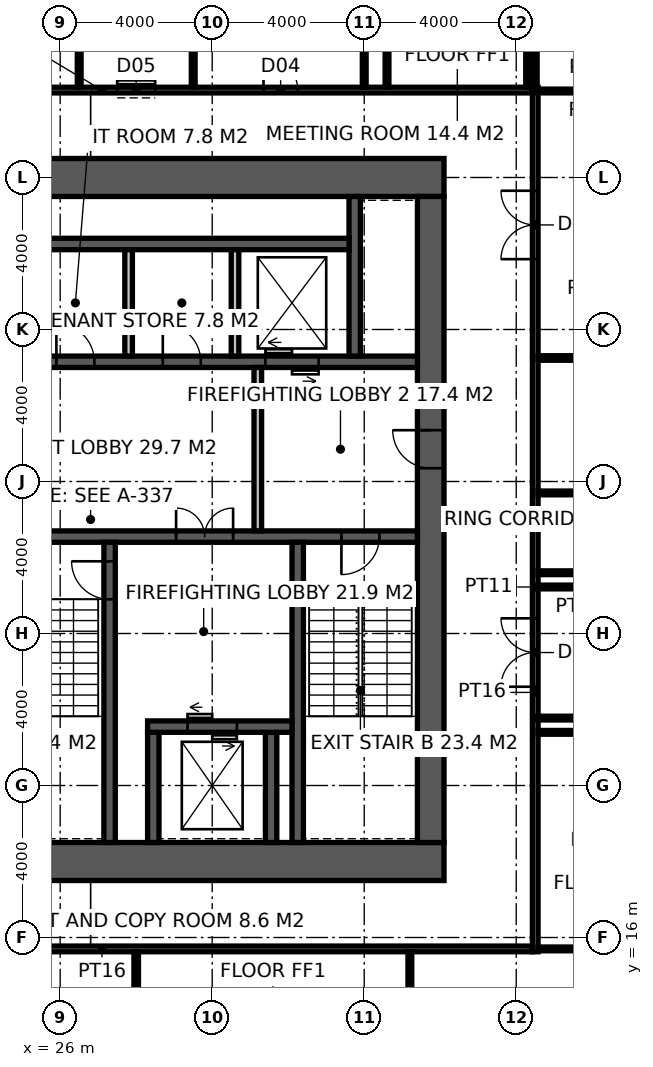
"""IFC4 building model, lengths in metres.
Left out: names, types, materials, properties, quantities, classifications, styles, units other than length and angle.
Written with IfcOpenShell. Run it as: python <this file> out.ifc"""

import sys

from ifc_helpers import new_model, si_unit, direction, frame, frame_2d, origin, place, context, subcontext, project, spatial, rectangle, extrude, element, fill, save


model = new_model("IFC4")
c1 = context("Model", 3, precision=1e-05, world=origin(), true_north=direction((0.0, 1.0)))
c2 = subcontext(c1, "Body", "Model", "MODEL_VIEW")
j1 = project(units=[si_unit("LENGTHUNIT", "METRE"), si_unit("PLANEANGLEUNIT", "RADIAN")], contexts=[c1])
p1 = place(None, origin())
s1 = spatial("IfcSite", under=j1, at=p1, CompositionType="ELEMENT")
p2 = place(p1, origin())
s2 = spatial("IfcBuilding", under=s1, at=p2, CompositionType="ELEMENT")
p3 = place(p2, frame((0.0, 0.0, 230.2)))
s3 = spatial("IfcBuildingStorey", under=s2, at=p3, CompositionType="ELEMENT", Elevation=230.2)
p4 = place(p3, frame((18.5, 18.0, -0.15), z_axis=(0.0, 0.0, 1.0), x_axis=(1.0, 0.0, 0.0)))
e1 = element("IfcWall", 1, at=p4, inside=s3, PredefinedType="SHEAR", context=c2, shape_type="SweptSolid", body=[
    extrude(rectangle(XDim=17.6, YDim=1.0, at=frame_2d((8.8, 0.0))), origin(), (0.0, 0.0, 1.0), 4.0),
])
p5 = place(p4, frame((3.45, 0.0, 0.15)))
e2 = element("IfcOpeningElement", 2, at=p5, cuts=e1, PredefinedType="OPENING", context=c2, shape_type="SweptSolid", body=[
    extrude(rectangle(XDim=1.5, YDim=2.4, at=frame_2d((0.75, 1.2))), frame((0.0, 0.51, 0.0), z_axis=(0.0, -1.0, 0.0), x_axis=(1.0, 0.0, 0.0)), (0.0, 0.0, 1.0), 1.02),
])
p6 = place(p3, frame((18.5, 36.0, -0.15), z_axis=(0.0, 0.0, 1.0), x_axis=(1.0, 0.0, 0.0)))
e3 = element("IfcWall", 3, at=p6, inside=s3, PredefinedType="SHEAR", context=c2, shape_type="SweptSolid", body=[
    extrude(rectangle(XDim=17.6, YDim=1.0, at=frame_2d((8.8, 0.0))), origin(), (0.0, 0.0, 1.0), 4.0),
])
p7 = place(p3, frame((35.75, 18.5, -0.15), z_axis=(0.0, 0.0, 1.0), x_axis=(0.0, 1.0, 0.0)))
e4 = element("IfcWall", 4, at=p7, inside=s3, PredefinedType="SHEAR", context=c2, shape_type="SweptSolid", body=[
    extrude(rectangle(XDim=17.0, YDim=0.7, at=frame_2d((8.5, 0.0))), origin(), (0.0, 0.0, 1.0), 4.0),
])
p8 = place(p7, frame((9.85, 0.0, 0.15)))
e5 = element("IfcOpeningElement", 5, at=p8, cuts=e4, PredefinedType="OPENING", context=c2, shape_type="SweptSolid", body=[
    extrude(rectangle(XDim=1.0, YDim=2.2, at=frame_2d((0.5, 1.1))), frame((0.0, 0.36, 0.0), z_axis=(0.0, -1.0, 0.0), x_axis=(1.0, 0.0, 0.0)), (0.0, 0.0, 1.0), 0.72),
])
p9 = place(p3, frame((24.15, 26.55, -0.15), z_axis=(0.0, 0.0, 1.0), x_axis=(1.0, 0.0, 0.0)))
e6 = element("IfcWall", 6, at=p9, inside=s3, PredefinedType="SHEAR", context=c2, shape_type="SweptSolid", body=[
    extrude(rectangle(XDim=11.25, YDim=0.3, at=frame_2d((5.625, 0.0))), origin(), (0.0, 0.0, 1.0), 4.0),
])
p10 = place(p9, frame((9.25, 0.0, 0.15)))
e7 = element("IfcOpeningElement", 7, at=p10, cuts=e6, PredefinedType="OPENING", context=c2, shape_type="SweptSolid", body=[
    extrude(rectangle(XDim=1.0, YDim=2.2, at=frame_2d((0.5, 1.1))), frame((0.0, 0.16, 0.0), z_axis=(0.0, -1.0, 0.0), x_axis=(1.0, 0.0, 0.0)), (0.0, 0.0, 1.0), 0.32),
])
p11 = place(p9, frame((4.9, 0.0, 0.15)))
e8 = element("IfcOpeningElement", 8, at=p11, cuts=e6, PredefinedType="OPENING", context=c2, shape_type="SweptSolid", body=[
    extrude(rectangle(XDim=1.5, YDim=2.4, at=frame_2d((0.75, 1.2))), frame((0.0, 0.16, 0.0), z_axis=(0.0, -1.0, 0.0), x_axis=(1.0, 0.0, 0.0)), (0.0, 0.0, 1.0), 0.32),
])
p12 = place(p3, frame((27.3, 18.5, -0.15), z_axis=(0.0, 0.0, 1.0), x_axis=(0.0, 1.0, 0.0)))
e9 = element("IfcWall", 9, at=p12, inside=s3, PredefinedType="SHEAR", context=c2, shape_type="SweptSolid", body=[
    extrude(rectangle(XDim=7.9, YDim=0.3, at=frame_2d((3.95, 0.0))), origin(), (0.0, 0.0, 1.0), 4.0),
])
p13 = place(p12, frame((6.4, 0.0, 0.15)))
e10 = element("IfcOpeningElement", 10, at=p13, cuts=e9, PredefinedType="OPENING", context=c2, shape_type="SweptSolid", body=[
    extrude(rectangle(XDim=1.0, YDim=2.2, at=frame_2d((0.5, 1.1))), frame((0.0, 0.16, 0.0), z_axis=(0.0, -1.0, 0.0), x_axis=(1.0, 0.0, 0.0)), (0.0, 0.0, 1.0), 0.32),
])
p14 = place(p3, frame((32.25, 18.5, -0.15), z_axis=(0.0, 0.0, 1.0), x_axis=(0.0, 1.0, 0.0)))
e11 = element("IfcWall", 11, at=p14, inside=s3, PredefinedType="SHEAR", context=c2, shape_type="SweptSolid", body=[
    extrude(rectangle(XDim=7.9, YDim=0.3, at=frame_2d((3.95, 0.0))), origin(), (0.0, 0.0, 1.0), 4.0),
])
for number, where, z_axis, x_axis in (
    (12, (28.45, 18.5, -0.15), (0.0, 0.0, 1.0), (0.0, 1.0, 0.0)),
    (13, (31.55, 18.5, -0.15), (0.0, 0.0, 1.0), (0.0, 1.0, 0.0)),
):
    element("IfcWall", number, at=place(p3, frame(where, z_axis=z_axis, x_axis=x_axis)), inside=s3, PredefinedType="SHEAR", context=c2, shape_type="SweptSolid", body=[
        extrude(rectangle(XDim=2.9, YDim=0.3, at=frame_2d((1.45, 0.0))), origin(), (0.0, 0.0, 1.0), 4.0),
    ])
p15 = place(p3, frame((28.3, 21.55, -0.15), z_axis=(0.0, 0.0, 1.0), x_axis=(1.0, 0.0, 0.0)))
e14 = element("IfcWall", 14, at=p15, inside=s3, PredefinedType="SHEAR", context=c2, shape_type="SweptSolid", body=[
    extrude(rectangle(XDim=3.8, YDim=0.3, at=frame_2d((1.9, 0.0))), origin(), (0.0, 0.0, 1.0), 4.0),
])
p16 = place(p15, frame((1.05, 0.0, 0.15)))
e15 = element("IfcOpeningElement", 15, at=p16, cuts=e14, PredefinedType="OPENING", context=c2, shape_type="SweptSolid", body=[
    extrude(rectangle(XDim=1.3, YDim=2.4, at=frame_2d((0.65, 1.2))), frame((0.0, 0.16, 0.0), z_axis=(0.0, -1.0, 0.0), x_axis=(1.0, 0.0, 0.0)), (0.0, 0.0, 1.0), 0.32),
])
p17 = place(p3, frame((24.15, 31.15, -0.15), z_axis=(0.0, 0.0, 1.0), x_axis=(1.0, 0.0, 0.0)))
e16 = element("IfcWall", 16, at=p17, inside=s3, PredefinedType="SHEAR", context=c2, shape_type="SweptSolid", body=[
    extrude(rectangle(XDim=11.25, YDim=0.3, at=frame_2d((5.625, 0.0))), origin(), (0.0, 0.0, 1.0), 4.0),
])
p18 = place(p17, frame((1.75, 0.0, 0.15)))
e17 = element("IfcOpeningElement", 17, at=p18, cuts=e16, PredefinedType="OPENING", context=c2, shape_type="SweptSolid", body=[
    extrude(rectangle(XDim=1.0, YDim=2.2, at=frame_2d((0.5, 1.1))), frame((0.0, 0.16, 0.0), z_axis=(0.0, -1.0, 0.0), x_axis=(1.0, 0.0, 0.0)), (0.0, 0.0, 1.0), 0.32),
])
p19 = place(p17, frame((4.55, 0.0, 0.15)))
e18 = element("IfcOpeningElement", 18, at=p19, cuts=e16, PredefinedType="OPENING", context=c2, shape_type="SweptSolid", body=[
    extrude(rectangle(XDim=1.0, YDim=2.2, at=frame_2d((0.5, 1.1))), frame((0.0, 0.16, 0.0), z_axis=(0.0, -1.0, 0.0), x_axis=(1.0, 0.0, 0.0)), (0.0, 0.0, 1.0), 0.32),
])
p20 = place(p17, frame((7.25, 0.0, 0.15)))
e19 = element("IfcOpeningElement", 19, at=p20, cuts=e16, PredefinedType="OPENING", context=c2, shape_type="SweptSolid", body=[
    extrude(rectangle(XDim=1.4, YDim=2.4, at=frame_2d((0.7, 1.2))), frame((0.0, 0.16, 0.0), z_axis=(0.0, -1.0, 0.0), x_axis=(1.0, 0.0, 0.0)), (0.0, 0.0, 1.0), 0.32),
])
p21 = place(p3, frame((33.75, 31.3, -0.15), z_axis=(0.0, 0.0, 1.0), x_axis=(0.0, 1.0, 0.0)))
e20 = element("IfcWall", 20, at=p21, inside=s3, PredefinedType="SHEAR", context=c2, shape_type="SweptSolid", body=[
    extrude(rectangle(XDim=4.2, YDim=0.3, at=frame_2d((2.1, 0.0))), origin(), (0.0, 0.0, 1.0), 4.0),
])
p22 = place(p3, frame((25.0, 34.25, -0.15), z_axis=(0.0, 0.0, 1.0), x_axis=(1.0, 0.0, 0.0)))
e21 = element("IfcWall", 21, at=p22, inside=s3, PredefinedType="SHEAR", context=c2, shape_type="SweptSolid", body=[
    extrude(rectangle(XDim=8.6, YDim=0.3, at=frame_2d((4.3, 0.0))), origin(), (0.0, 0.0, 1.0), 4.0),
])
for number, where, z_axis, x_axis in (
    (22, (27.8, 31.3, -0.15), (0.0, 0.0, 1.0), (0.0, 1.0, 0.0)),
    (23, (30.6, 31.3, -0.15), (0.0, 0.0, 1.0), (0.0, 1.0, 0.0)),
):
    element("IfcWall", number, at=place(p3, frame(where, z_axis=z_axis, x_axis=x_axis)), inside=s3, PredefinedType="SOLIDWALL", context=c2, shape_type="SweptSolid", body=[
        extrude(rectangle(XDim=2.8, YDim=0.2, at=frame_2d((1.4, 0.0))), origin(), (0.0, 0.0, 1.0), 4.0),
    ])
p23 = place(p3, frame((31.2, 26.7, 0.0), z_axis=(0.0, 0.0, 1.0), x_axis=(0.0, 1.0, 0.0)))
e24 = element("IfcWall", 24, at=p23, inside=s3, PredefinedType="SOLIDWALL", context=c2, shape_type="SweptSolid", body=[
    extrude(rectangle(XDim=4.3, YDim=0.2, at=frame_2d((2.15, 0.0))), origin(), (0.0, 0.0, 1.0), 3.85),
])
p24 = place(p3, frame((38.5, 15.625, 0.0), z_axis=(0.0, 0.0, 1.0), x_axis=(0.0, 1.0, 0.0)))
e25 = element("IfcWall", 25, at=p24, inside=s3, PredefinedType="PARTITIONING", context=c2, shape_type="SweptSolid", body=[
    extrude(rectangle(XDim=22.75, YDim=0.15, at=frame_2d((11.375, 0.0))), origin(), (0.0, 0.0, 1.0), 3.85),
])
p25 = place(p24, frame((6.974, 0.0, 0.0)))
e26 = element("IfcOpeningElement", 26, at=p25, cuts=e25, PredefinedType="OPENING", context=c2, shape_type="SweptSolid", body=[
    extrude(rectangle(XDim=1.8, YDim=2.4, at=frame_2d((0.9, 1.2))), frame((0.0, 0.085, 0.0), z_axis=(0.0, -1.0, 0.0), x_axis=(1.0, 0.0, 0.0)), (0.0, 0.0, 1.0), 0.17),
])
p26 = place(p24, frame((18.226, 0.0, 0.0)))
e27 = element("IfcOpeningElement", 27, at=p26, cuts=e25, PredefinedType="OPENING", context=c2, shape_type="SweptSolid", body=[
    extrude(rectangle(XDim=1.8, YDim=2.4, at=frame_2d((0.9, 1.2))), frame((0.0, 0.085, 0.0), z_axis=(0.0, -1.0, 0.0), x_axis=(1.0, 0.0, 0.0)), (0.0, 0.0, 1.0), 0.17),
])
p27 = place(p3, frame((15.775, 15.7, 0.0), z_axis=(0.0, 0.0, 1.0), x_axis=(1.0, 0.0, 0.0)))
e28 = element("IfcWall", 28, at=p27, inside=s3, PredefinedType="PARTITIONING", context=c2, shape_type="SweptSolid", body=[
    extrude(rectangle(XDim=22.65, YDim=0.15, at=frame_2d((11.325, 0.0))), origin(), (0.0, 0.0, 1.0), 3.85),
])
p28 = place(p3, frame((15.775, 38.3, 0.0), z_axis=(0.0, 0.0, 1.0), x_axis=(1.0, 0.0, 0.0)))
e29 = element("IfcWall", 29, at=p28, inside=s3, PredefinedType="PARTITIONING", context=c2, shape_type="SweptSolid", body=[
    extrude(rectangle(XDim=22.65, YDim=0.15, at=frame_2d((11.325, 0.0))), origin(), (0.0, 0.0, 1.0), 3.85),
])
p29 = place(p28, frame((7.975, 0.0, 0.0)))
e30 = element("IfcOpeningElement", 30, at=p29, cuts=e29, PredefinedType="OPENING", context=c2, shape_type="SweptSolid", body=[
    extrude(rectangle(XDim=0.9, YDim=2.1, at=frame_2d((0.45, 1.05))), frame((0.0, 0.085, 0.0), z_axis=(0.0, -1.0, 0.0), x_axis=(1.0, 0.0, 0.0)), (0.0, 0.0, 1.0), 0.17),
])
p30 = place(p28, frame((11.725, 0.0, 0.0)))
e31 = element("IfcOpeningElement", 31, at=p30, cuts=e29, PredefinedType="OPENING", context=c2, shape_type="SweptSolid", body=[
    extrude(rectangle(XDim=1.0, YDim=2.1, at=frame_2d((0.5, 1.05))), frame((0.0, 0.085, 0.0), z_axis=(0.0, -1.0, 0.0), x_axis=(1.0, 0.0, 0.0)), (0.0, 0.0, 1.0), 0.17),
])
p31 = place(p28, frame((15.575, 0.0, 0.0)))
e32 = element("IfcOpeningElement", 32, at=p31, cuts=e29, PredefinedType="OPENING", context=c2, shape_type="SweptSolid", body=[
    extrude(rectangle(XDim=0.9, YDim=2.1, at=frame_2d((0.45, 1.05))), frame((0.0, 0.085, 0.0), z_axis=(0.0, -1.0, 0.0), x_axis=(1.0, 0.0, 0.0)), (0.0, 0.0, 1.0), 0.17),
])
p32 = place(p3, frame((34.0, 38.375, 0.0), z_axis=(0.0, 0.0, 1.0), x_axis=(0.0, 1.0, 0.0)))
e33 = element("IfcWall", 33, at=p32, inside=s3, PredefinedType="PARTITIONING", context=c2, shape_type="SweptSolid", body=[
    extrude(rectangle(XDim=3.675, YDim=0.1, at=frame_2d((1.837, 0.0))), origin(), (0.0, 0.0, 1.0), 2.95),
])
for number, where, z_axis, x_axis in (
    (34, (26.5, 38.375, 0.0), (0.0, 0.0, 1.0), (0.0, 1.0, 0.0)),
    (35, (29.5, 38.375, 0.0), (0.0, 0.0, 1.0), (0.0, 1.0, 0.0)),
):
    element("IfcWall", number, at=place(p3, frame(where, z_axis=z_axis, x_axis=x_axis)), inside=s3, PredefinedType="PARTITIONING", context=c2, shape_type="SweptSolid", body=[
        extrude(rectangle(XDim=3.575, YDim=0.1, at=frame_2d((1.788, 0.0))), origin(), (0.0, 0.0, 1.0), 3.85),
    ])
p33 = place(p3, frame((28.0, 8.3, 0.0), z_axis=(0.0, 0.0, 1.0), x_axis=(0.0, 1.0, 0.0)))
e36 = element("IfcWall", 36, at=p33, inside=s3, PredefinedType="PARTITIONING", context=c2, shape_type="SweptSolid", body=[
    extrude(rectangle(XDim=7.325, YDim=0.12, at=frame_2d((3.663, 0.0))), origin(), (0.0, 0.0, 1.0), 3.85),
])
p34 = place(p3, frame((38.575, 31.25, 0.0), z_axis=(0.0, 0.0, 1.0), x_axis=(1.0, 0.0, 0.0)))
e37 = element("IfcWall", 37, at=p34, inside=s3, PredefinedType="PARTITIONING", context=c2, shape_type="SweptSolid", body=[
    extrude(rectangle(XDim=11.125, YDim=0.12, at=frame_2d((5.562, 0.0))), origin(), (0.0, 0.0, 1.0), 3.85),
])
for number, where, z_axis, x_axis in (
    (38, (38.575, 15.7, 0.0), (0.0, 0.0, 1.0), (1.0, 0.0, 0.0)),
    (39, (38.575, 21.399, 0.0), (0.0, 0.0, 1.0), (1.0, 0.0, 0.0)),
    (40, (38.575, 25.599, 0.0), (0.0, 0.0, 1.0), (1.0, 0.0, 0.0)),
    (41, (38.575, 27.699, 0.0), (0.0, 0.0, 1.0), (1.0, 0.0, 0.0)),
):
    element("IfcWall", number, at=place(p3, frame(where, z_axis=z_axis, x_axis=x_axis)), inside=s3, PredefinedType="PARTITIONING", context=c2, shape_type="SweptSolid", body=[
        extrude(rectangle(XDim=5.975, YDim=0.1, at=frame_2d((2.988, 0.0))), origin(), (0.0, 0.0, 1.0), 3.85),
    ])
p35 = place(p3, frame((34.6, 38.375, 0.0), z_axis=(0.0, 0.0, 1.0), x_axis=(0.0, 1.0, 0.0)))
e42 = element("IfcWall", 42, at=p35, inside=s3, PredefinedType="PARTITIONING", context=c2, shape_type="SweptSolid", body=[
    extrude(rectangle(XDim=4.075, YDim=0.1, at=frame_2d((2.038, 0.0))), origin(), (0.0, 0.0, 1.0), 3.85),
])
p36 = place(p3, frame((35.201, 12.15, 0.0), z_axis=(0.0, 0.0, 1.0), x_axis=(0.0, 1.0, 0.0)))
e43 = element("IfcWall", 43, at=p36, inside=s3, PredefinedType="PARTITIONING", context=c2, shape_type="SweptSolid", body=[
    extrude(rectangle(XDim=3.475, YDim=0.1, at=frame_2d((1.738, 0.0))), origin(), (0.0, 0.0, 1.0), 3.85),
])
p37 = place(p3, frame((38.3, 38.375, 0.0), z_axis=(0.0, 0.0, 1.0), x_axis=(0.0, 1.0, 0.0)))
e44 = element("IfcWall", 44, at=p37, inside=s3, PredefinedType="PARTITIONING", context=c2, shape_type="SweptSolid", body=[
    extrude(rectangle(XDim=4.075, YDim=0.1, at=frame_2d((2.038, 0.0))), origin(), (0.0, 0.0, 1.0), 2.95),
])
for number, where, z_axis, x_axis in (
    (45, (38.5, 21.774, 0.0), (0.0, 0.0, 1.0), (1.0, 0.0, 0.0)),
    (46, (41.65, 25.224, 0.0), (0.0, 0.0, 1.0), (-1.0, 0.0, 0.0)),
):
    element("IfcWall", number, at=place(p3, frame(where, z_axis=z_axis, x_axis=x_axis)), inside=s3, PredefinedType="PARTITIONING", context=c2, shape_type="SweptSolid", body=[
        extrude(rectangle(XDim=3.15, YDim=0.1, at=frame_2d((1.575, 0.0))), origin(), (0.0, 0.0, 1.0), 3.85),
    ])
p38 = place(p3, frame((38.5, 38.276, 0.0), z_axis=(0.0, 0.0, 1.0), x_axis=(1.0, 0.0, 0.0)))
e47 = element("IfcWall", 47, at=p38, inside=s3, PredefinedType="PARTITIONING", context=c2, shape_type="SweptSolid", body=[
    extrude(rectangle(XDim=3.05, YDim=0.1, at=frame_2d((1.525, 0.0))), origin(), (0.0, 0.0, 1.0), 3.85),
])
p39 = place(p3, frame((38.5, 43.826, 0.0), z_axis=(0.0, 0.0, 1.0), x_axis=(0.0, -1.0, 0.0)))
e48 = element("IfcWall", 48, at=p39, inside=s3, PredefinedType="PARTITIONING", context=c2, shape_type="SweptSolid", body=[
    extrude(rectangle(XDim=5.526, YDim=0.1, at=frame_2d((2.763, 0.0))), origin(), (0.0, 0.0, 1.0), 3.85),
])
p40 = place(p13, origin())
e49 = element("IfcDoor", 49, at=p40, inside=s3, OperationType="SINGLE_SWING_RIGHT", PredefinedType="DOOR", context=c2, shape_type="SweptSolid", body=[
    extrude(rectangle(XDim=1.0, YDim=2.2, at=frame_2d((0.5, 1.1))), frame((0.0, 0.025, 0.0), z_axis=(0.0, -1.0, 0.0), x_axis=(1.0, 0.0, 0.0)), (0.0, 0.0, 1.0), 0.05),
])
fill(e10, e49)
p41 = place(p10, frame((1.0, 0.0, 0.0), z_axis=(0.0, 0.0, 1.0), x_axis=(-1.0, 0.0, 0.0)))
e50 = element("IfcDoor", 50, at=p41, inside=s3, OperationType="SINGLE_SWING_RIGHT", PredefinedType="DOOR", context=c2, shape_type="SweptSolid", body=[
    extrude(rectangle(XDim=1.0, YDim=2.2, at=frame_2d((0.5, 1.1))), frame((0.0, 0.025, 0.0), z_axis=(0.0, -1.0, 0.0), x_axis=(1.0, 0.0, 0.0)), (0.0, 0.0, 1.0), 0.05),
])
fill(e7, e50)
p42 = place(p8, origin())
e51 = element("IfcDoor", 51, at=p42, inside=s3, OperationType="SINGLE_SWING_RIGHT", PredefinedType="DOOR", context=c2, shape_type="SweptSolid", body=[
    extrude(rectangle(XDim=1.0, YDim=2.2, at=frame_2d((0.5, 1.1))), frame((0.0, 0.025, 0.0), z_axis=(0.0, -1.0, 0.0), x_axis=(1.0, 0.0, 0.0)), (0.0, 0.0, 1.0), 0.05),
])
fill(e5, e51)
p43 = place(p11, origin())
e52 = element("IfcDoor", 52, at=p43, inside=s3, OperationType="DOUBLE_DOOR_DOUBLE_SWING", PredefinedType="DOOR", context=c2, shape_type="SweptSolid", body=[
    extrude(rectangle(XDim=1.5, YDim=2.4, at=frame_2d((0.75, 1.2))), frame((0.0, 0.025, 0.0), z_axis=(0.0, -1.0, 0.0), x_axis=(1.0, 0.0, 0.0)), (0.0, 0.0, 1.0), 0.05),
])
fill(e8, e52)
p44 = place(p18, origin())
e53 = element("IfcDoor", 53, at=p44, inside=s3, OperationType="SINGLE_SWING_LEFT", PredefinedType="DOOR", context=c2, shape_type="SweptSolid", body=[
    extrude(rectangle(XDim=1.0, YDim=2.2, at=frame_2d((0.5, 1.1))), frame((0.0, 0.025, 0.0), z_axis=(0.0, -1.0, 0.0), x_axis=(1.0, 0.0, 0.0)), (0.0, 0.0, 1.0), 0.05),
])
fill(e17, e53)
p45 = place(p19, origin())
e54 = element("IfcDoor", 54, at=p45, inside=s3, OperationType="SINGLE_SWING_LEFT", PredefinedType="DOOR", context=c2, shape_type="SweptSolid", body=[
    extrude(rectangle(XDim=1.0, YDim=2.2, at=frame_2d((0.5, 1.1))), frame((0.0, 0.025, 0.0), z_axis=(0.0, -1.0, 0.0), x_axis=(1.0, 0.0, 0.0)), (0.0, 0.0, 1.0), 0.05),
])
fill(e18, e54)
p46 = place(p30, origin())
e55 = element("IfcDoor", 55, at=p46, inside=s3, OperationType="SLIDING_TO_LEFT", PredefinedType="DOOR", context=c2, shape_type="SweptSolid", body=[
    extrude(rectangle(XDim=1.0, YDim=2.1, at=frame_2d((0.5, 1.05))), frame((0.0, 0.025, 0.0), z_axis=(0.0, -1.0, 0.0), x_axis=(1.0, 0.0, 0.0)), (0.0, 0.0, 1.0), 0.05),
])
fill(e31, e55)
p47 = place(p31, origin())
e56 = element("IfcDoor", 56, at=p47, inside=s3, OperationType="SINGLE_SWING_LEFT", PredefinedType="DOOR", context=c2, shape_type="SweptSolid", body=[
    extrude(rectangle(XDim=0.9, YDim=2.1, at=frame_2d((0.45, 1.05))), frame((0.0, 0.025, 0.0), z_axis=(0.0, -1.0, 0.0), x_axis=(1.0, 0.0, 0.0)), (0.0, 0.0, 1.0), 0.05),
])
fill(e32, e56)
p48 = place(p25, origin())
e57 = element("IfcDoor", 57, at=p48, inside=s3, OperationType="DOUBLE_DOOR_DOUBLE_SWING", PredefinedType="DOOR", context=c2, shape_type="SweptSolid", body=[
    extrude(rectangle(XDim=1.8, YDim=2.4, at=frame_2d((0.9, 1.2))), frame((0.0, 0.025, 0.0), z_axis=(0.0, -1.0, 0.0), x_axis=(1.0, 0.0, 0.0)), (0.0, 0.0, 1.0), 0.05),
])
fill(e26, e57)
p49 = place(p26, origin())
e58 = element("IfcDoor", 58, at=p49, inside=s3, OperationType="DOUBLE_DOOR_DOUBLE_SWING", PredefinedType="DOOR", context=c2, shape_type="SweptSolid", body=[
    extrude(rectangle(XDim=1.8, YDim=2.4, at=frame_2d((0.9, 1.2))), frame((0.0, 0.025, 0.0), z_axis=(0.0, -1.0, 0.0), x_axis=(1.0, 0.0, 0.0)), (0.0, 0.0, 1.0), 0.05),
])
fill(e27, e58)
p50 = place(p16, origin())
e59 = element("IfcDoor", 59, at=p50, inside=s3, OperationType="DOUBLE_DOOR_SLIDING", PredefinedType="DOOR", context=c2, shape_type="SweptSolid", body=[
    extrude(rectangle(XDim=1.3, YDim=2.4, at=frame_2d((0.65, 1.2))), frame((0.0, 0.025, 0.0), z_axis=(0.0, -1.0, 0.0), x_axis=(1.0, 0.0, 0.0)), (0.0, 0.0, 1.0), 0.05),
])
fill(e15, e59)
p51 = place(p20, origin())
e60 = element("IfcDoor", 60, at=p51, inside=s3, OperationType="DOUBLE_DOOR_SLIDING", PredefinedType="DOOR", context=c2, shape_type="SweptSolid", body=[
    extrude(rectangle(XDim=1.4, YDim=2.4, at=frame_2d((0.7, 1.2))), frame((0.0, 0.025, 0.0), z_axis=(0.0, -1.0, 0.0), x_axis=(1.0, 0.0, 0.0)), (0.0, 0.0, 1.0), 0.05),
])
fill(e19, e60)
save(model, sys.argv[1])
